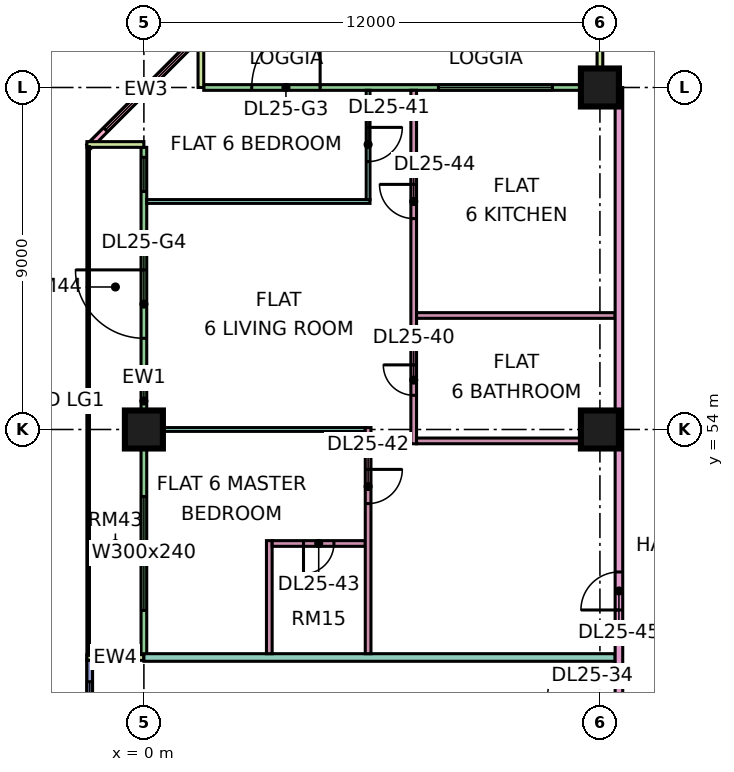
"""IFC4 building model, lengths in metres.
Left out: names, types, materials, properties, quantities, classifications, styles, units other than length and angle.
Written with IfcOpenShell. Run it as: python <this file> out.ifc"""

import sys

from ifc_helpers import new_model, si_unit, direction, frame, frame_2d, origin, origin_2d, place, context, subcontext, project, spatial, rectangle, extrude, element, fill, save


model = new_model("IFC4")
c1 = context("Model", 3, precision=1e-05, world=origin(), true_north=direction((0.0, 1.0)))
c2 = subcontext(c1, "Body", "Model", "MODEL_VIEW")
j1 = project(units=[si_unit("LENGTHUNIT", "METRE"), si_unit("PLANEANGLEUNIT", "RADIAN")], contexts=[c1])
p1 = place(None, origin())
s1 = spatial("IfcSite", under=j1, at=p1, CompositionType="ELEMENT")
p2 = place(p1, origin())
s2 = spatial("IfcBuilding", under=s1, at=p2, CompositionType="ELEMENT")
p3 = place(p2, frame((0.0, 0.0, 110.65)))
s3 = spatial("IfcBuildingStorey", under=s2, at=p3, CompositionType="ELEMENT", Elevation=110.65)
for number, where, z_axis, x_axis in (
    (1, (0.0, 54.0, 0.0), (0.0, 0.0, 1.0), (1.0, 0.0, 0.0)),
    (2, (12.0, 54.0, 0.0), (0.0, 0.0, 1.0), (1.0, 0.0, 0.0)),
    (3, (12.0, 63.0, 0.0), (0.0, 0.0, 1.0), (1.0, 0.0, 0.0)),
):
    element("IfcColumn", number, at=place(p3, frame(where, z_axis=z_axis, x_axis=x_axis)), inside=s3, PredefinedType="COLUMN", context=c2, shape_type="SweptSolid", body=[
        extrude(rectangle(XDim=1.0, YDim=1.0, at=origin_2d()), origin(), (0.0, 0.0, 1.0), 3.75),
    ])
p4 = place(p3, frame((11.925, 63.0, 0.0), z_axis=(0.0, 0.0, 1.0), x_axis=(-1.0, 0.0, 0.0)))
e4 = element("IfcWall", 4, at=p4, inside=s3, PredefinedType="SOLIDWALL", context=c2, shape_type="SweptSolid", body=[
    extrude(rectangle(XDim=10.35, YDim=0.15, at=frame_2d((5.175, 0.0))), origin(), (0.0, 0.0, 1.0), 3.35),
])
p5 = place(p4, frame((1.175, 0.0, 0.45)))
e5 = element("IfcOpeningElement", 5, at=p5, cuts=e4, PredefinedType="OPENING", context=c2, shape_type="SweptSolid", body=[
    extrude(rectangle(XDim=3.0, YDim=2.4, at=frame_2d((1.5, 1.2))), frame((0.0, 0.085, 0.0), z_axis=(0.0, -1.0, 0.0), x_axis=(1.0, 0.0, 0.0)), (0.0, 0.0, 1.0), 0.17),
])
p6 = place(p4, frame((7.288, 0.0, 0.0)))
e6 = element("IfcOpeningElement", 6, at=p6, cuts=e4, PredefinedType="OPENING", context=c2, shape_type="SweptSolid", body=[
    extrude(rectangle(XDim=1.8, YDim=2.4, at=frame_2d((0.9, 1.2))), frame((0.0, 0.085, 0.0), z_axis=(0.0, -1.0, 0.0), x_axis=(1.0, 0.0, 0.0)), (0.0, 0.0, 1.0), 0.17),
])
for number, where, z_axis, x_axis in (
    (7, (12.0, 64.5, 0.0), (0.0, 0.0, 1.0), (0.0, -1.0, 0.0)),
    (8, (1.5, 64.5, 0.0), (0.0, 0.0, 1.0), (0.0, -1.0, 0.0)),
):
    element("IfcWall", number, at=place(p3, frame(where, z_axis=z_axis, x_axis=x_axis)), inside=s3, PredefinedType="SOLIDWALL", context=c2, shape_type="SweptSolid", body=[
        extrude(rectangle(XDim=1.5, YDim=0.15, at=frame_2d((0.75, 0.0))), origin(), (0.0, 0.0, 1.0), 3.35),
    ])
p7 = place(p3, frame((1.553, 64.447, 0.0), z_axis=(0.0, 0.0, 1.0), x_axis=(-0.707106781187, -0.707106781187, 0.0)))
e9 = element("IfcWall", 9, at=p7, inside=s3, PredefinedType="SOLIDWALL", context=c2, shape_type="SweptSolid", body=[
    extrude(rectangle(XDim=4.243, YDim=0.15, at=frame_2d((2.121, 0.0))), origin(), (0.0, 0.0, 1.0), 3.35),
])
p8 = place(p7, frame((0.621, 0.0, 0.45)))
e10 = element("IfcOpeningElement", 10, at=p8, cuts=e9, PredefinedType="OPENING", context=c2, shape_type="SweptSolid", body=[
    extrude(rectangle(XDim=3.0, YDim=2.4, at=frame_2d((1.5, 1.2))), frame((0.0, 0.085, 0.0), z_axis=(0.0, -1.0, 0.0), x_axis=(1.0, 0.0, 0.0)), (0.0, 0.0, 1.0), 0.17),
])
p9 = place(p3, frame((0.0, 61.425, 0.0), z_axis=(0.0, 0.0, 1.0), x_axis=(0.0, -1.0, 0.0)))
e11 = element("IfcWall", 11, at=p9, inside=s3, PredefinedType="SOLIDWALL", context=c2, shape_type="SweptSolid", body=[
    extrude(rectangle(XDim=13.35, YDim=0.15, at=frame_2d((6.675, 0.0))), origin(), (0.0, 0.0, 1.0), 3.35),
])
p10 = place(p9, frame((0.262, 0.0, 0.45)))
e12 = element("IfcOpeningElement", 12, at=p10, cuts=e11, PredefinedType="OPENING", context=c2, shape_type="SweptSolid", body=[
    extrude(rectangle(XDim=0.9, YDim=2.4, at=frame_2d((0.45, 1.2))), frame((0.0, 0.085, 0.0), z_axis=(0.0, -1.0, 0.0), x_axis=(1.0, 0.0, 0.0)), (0.0, 0.0, 1.0), 0.17),
])
p11 = place(p9, frame((3.225, 0.0, 0.0)))
e13 = element("IfcOpeningElement", 13, at=p11, cuts=e11, PredefinedType="OPENING", context=c2, shape_type="SweptSolid", body=[
    extrude(rectangle(XDim=1.8, YDim=2.4, at=frame_2d((0.9, 1.2))), frame((0.0, 0.085, 0.0), z_axis=(0.0, -1.0, 0.0), x_axis=(1.0, 0.0, 0.0)), (0.0, 0.0, 1.0), 0.17),
])
p12 = place(p9, frame((9.188, 0.0, 0.45)))
e14 = element("IfcOpeningElement", 14, at=p12, cuts=e11, PredefinedType="OPENING", context=c2, shape_type="SweptSolid", body=[
    extrude(rectangle(XDim=3.0, YDim=2.4, at=frame_2d((1.5, 1.2))), frame((0.0, 0.085, 0.0), z_axis=(0.0, -1.0, 0.0), x_axis=(1.0, 0.0, 0.0)), (0.0, 0.0, 1.0), 0.17),
])
for number, where, z_axis, x_axis in (
    (15, (-1.5, 61.5, 0.0), (0.0, 0.0, 1.0), (1.0, 0.0, 0.0)),
    (16, (-1.5, 48.0, 0.0), (0.0, 0.0, 1.0), (1.0, 0.0, 0.0)),
):
    element("IfcWall", number, at=place(p3, frame(where, z_axis=z_axis, x_axis=x_axis)), inside=s3, PredefinedType="SOLIDWALL", context=c2, shape_type="SweptSolid", body=[
        extrude(rectangle(XDim=1.5, YDim=0.15, at=frame_2d((0.75, 0.0))), origin(), (0.0, 0.0, 1.0), 3.35),
    ])
p13 = place(p3, frame((-1.425, 47.925, 0.0), z_axis=(0.0, 0.0, 1.0), x_axis=(0.0, -1.0, 0.0)))
e17 = element("IfcWall", 17, at=p13, inside=s3, PredefinedType="SOLIDWALL", context=c2, shape_type="SweptSolid", body=[
    extrude(rectangle(XDim=11.85, YDim=0.15, at=frame_2d((5.925, 0.0))), origin(), (0.0, 0.0, 1.0), 3.35),
])
p14 = place(p13, frame((0.562, 0.0, 0.45)))
e18 = element("IfcOpeningElement", 18, at=p14, cuts=e17, PredefinedType="OPENING", context=c2, shape_type="SweptSolid", body=[
    extrude(rectangle(XDim=1.8, YDim=2.4, at=frame_2d((0.9, 1.2))), frame((0.0, 0.085, 0.0), z_axis=(0.0, -1.0, 0.0), x_axis=(1.0, 0.0, 0.0)), (0.0, 0.0, 1.0), 0.17),
])
p15 = place(p13, frame((4.425, 0.0, 0.45)))
e19 = element("IfcOpeningElement", 19, at=p15, cuts=e17, PredefinedType="OPENING", context=c2, shape_type="SweptSolid", body=[
    extrude(rectangle(XDim=3.0, YDim=2.4, at=frame_2d((1.5, 1.2))), frame((0.0, 0.085, 0.0), z_axis=(0.0, -1.0, 0.0), x_axis=(1.0, 0.0, 0.0)), (0.0, 0.0, 1.0), 0.17),
])
p16 = place(p13, frame((9.488, 0.0, 0.45)))
e20 = element("IfcOpeningElement", 20, at=p16, cuts=e17, PredefinedType="OPENING", context=c2, shape_type="SweptSolid", body=[
    extrude(rectangle(XDim=1.8, YDim=2.4, at=frame_2d((0.9, 1.2))), frame((0.0, 0.085, 0.0), z_axis=(0.0, -1.0, 0.0), x_axis=(1.0, 0.0, 0.0)), (0.0, 0.0, 1.0), 0.17),
])
p17 = place(p3, frame((0.0, 48.0, 0.0), z_axis=(0.0, 0.0, 1.0), x_axis=(1.0, 0.0, 0.0)))
e21 = element("IfcWall", 21, at=p17, inside=s3, PredefinedType="PARTITIONING", context=c2, shape_type="SweptSolid", body=[
    extrude(rectangle(XDim=12.4, YDim=0.2, at=frame_2d((6.2, 0.0))), origin(), (0.0, 0.0, 1.0), 3.35),
])
p18 = place(p3, frame((0.074, 54.0, 0.0), z_axis=(0.0, 0.0, 1.0), x_axis=(1.0, 0.0, 0.0)))
e22 = element("IfcWall", 22, at=p18, inside=s3, PredefinedType="PARTITIONING", context=c2, shape_type="SweptSolid", body=[
    extrude(rectangle(XDim=5.751, YDim=0.1, at=frame_2d((2.875, 0.0))), origin(), (0.0, 0.0, 1.0), 3.35),
])
p19 = place(p3, frame((0.074, 60.0, 0.0), z_axis=(0.0, 0.0, 1.0), x_axis=(1.0, 0.0, 0.0)))
e23 = element("IfcWall", 23, at=p19, inside=s3, PredefinedType="PARTITIONING", context=c2, shape_type="SweptSolid", body=[
    extrude(rectangle(XDim=5.876, YDim=0.1, at=frame_2d((2.938, 0.0))), origin(), (0.0, 0.0, 1.0), 3.35),
])
p20 = place(p3, frame((3.3, 48.1, 0.0), z_axis=(0.0, 0.0, 1.0), x_axis=(0.0, 1.0, 0.0)))
e24 = element("IfcWall", 24, at=p20, inside=s3, PredefinedType="PARTITIONING", context=c2, shape_type="SweptSolid", body=[
    extrude(rectangle(XDim=2.975, YDim=0.15, at=frame_2d((1.487, 0.0))), origin(), (0.0, 0.0, 1.0), 3.35),
])
p21 = place(p3, frame((3.375, 51.0, 0.0), z_axis=(0.0, 0.0, 1.0), x_axis=(1.0, 0.0, 0.0)))
e25 = element("IfcWall", 25, at=p21, inside=s3, PredefinedType="PARTITIONING", context=c2, shape_type="SweptSolid", body=[
    extrude(rectangle(XDim=2.45, YDim=0.15, at=frame_2d((1.225, 0.0))), origin(), (0.0, 0.0, 1.0), 3.35),
])
p22 = place(p21, frame((0.825, 0.0, 0.0)))
e26 = element("IfcOpeningElement", 26, at=p22, cuts=e25, PredefinedType="OPENING", context=c2, shape_type="SweptSolid", body=[
    extrude(rectangle(XDim=0.8, YDim=2.1, at=frame_2d((0.4, 1.05))), frame((0.0, 0.085, 0.0), z_axis=(0.0, -1.0, 0.0), x_axis=(1.0, 0.0, 0.0)), (0.0, 0.0, 1.0), 0.17),
])
p23 = place(p3, frame((5.9, 48.1, 0.0), z_axis=(0.0, 0.0, 1.0), x_axis=(0.0, 1.0, 0.0)))
e27 = element("IfcWall", 27, at=p23, inside=s3, PredefinedType="PARTITIONING", context=c2, shape_type="SweptSolid", body=[
    extrude(rectangle(XDim=5.95, YDim=0.15, at=frame_2d((2.975, 0.0))), origin(), (0.0, 0.0, 1.0), 3.35),
])
p24 = place(p23, frame((3.95, 0.0, 0.0)))
e28 = element("IfcOpeningElement", 28, at=p24, cuts=e27, PredefinedType="OPENING", context=c2, shape_type="SweptSolid", body=[
    extrude(rectangle(XDim=0.9, YDim=2.1, at=frame_2d((0.45, 1.05))), frame((0.0, 0.085, 0.0), z_axis=(0.0, -1.0, 0.0), x_axis=(1.0, 0.0, 0.0)), (0.0, 0.0, 1.0), 0.17),
])
p25 = place(p3, frame((5.9, 60.05, 0.0), z_axis=(0.0, 0.0, 1.0), x_axis=(0.0, 1.0, 0.0)))
e29 = element("IfcWall", 29, at=p25, inside=s3, PredefinedType="PARTITIONING", context=c2, shape_type="SweptSolid", body=[
    extrude(rectangle(XDim=2.876, YDim=0.1, at=frame_2d((1.438, 0.0))), origin(), (0.0, 0.0, 1.0), 3.35),
])
p26 = place(p25, frame((1.0, 0.0, 0.0)))
e30 = element("IfcOpeningElement", 30, at=p26, cuts=e29, PredefinedType="OPENING", context=c2, shape_type="SweptSolid", body=[
    extrude(rectangle(XDim=0.9, YDim=2.1, at=frame_2d((0.45, 1.05))), frame((0.0, 0.06, 0.0), z_axis=(0.0, -1.0, 0.0), x_axis=(1.0, 0.0, 0.0)), (0.0, 0.0, 1.0), 0.12),
])
p27 = place(p3, frame((7.1, 53.625, 0.0), z_axis=(0.0, 0.0, 1.0), x_axis=(0.0, 1.0, 0.0)))
e31 = element("IfcWall", 31, at=p27, inside=s3, PredefinedType="PARTITIONING", context=c2, shape_type="SweptSolid", body=[
    extrude(rectangle(XDim=9.301, YDim=0.15, at=frame_2d((4.65, 0.0))), origin(), (0.0, 0.0, 1.0), 3.35),
])
p28 = place(p27, frame((1.275, 0.0, 0.0)))
e32 = element("IfcOpeningElement", 32, at=p28, cuts=e31, PredefinedType="OPENING", context=c2, shape_type="SweptSolid", body=[
    extrude(rectangle(XDim=0.8, YDim=2.1, at=frame_2d((0.4, 1.05))), frame((0.0, 0.085, 0.0), z_axis=(0.0, -1.0, 0.0), x_axis=(1.0, 0.0, 0.0)), (0.0, 0.0, 1.0), 0.17),
])
p29 = place(p27, frame((5.925, 0.0, 0.0)))
e33 = element("IfcOpeningElement", 33, at=p29, cuts=e31, PredefinedType="OPENING", context=c2, shape_type="SweptSolid", body=[
    extrude(rectangle(XDim=0.9, YDim=2.1, at=frame_2d((0.45, 1.05))), frame((0.0, 0.085, 0.0), z_axis=(0.0, -1.0, 0.0), x_axis=(1.0, 0.0, 0.0)), (0.0, 0.0, 1.0), 0.17),
])
for number, where, z_axis, x_axis in (
    (34, (7.175, 53.7, 0.0), (0.0, 0.0, 1.0), (1.0, 0.0, 0.0)),
    (35, (7.175, 57.0, 0.0), (0.0, 0.0, 1.0), (1.0, 0.0, 0.0)),
):
    element("IfcWall", number, at=place(p3, frame(where, z_axis=z_axis, x_axis=x_axis)), inside=s3, PredefinedType="PARTITIONING", context=c2, shape_type="SweptSolid", body=[
        extrude(rectangle(XDim=5.225, YDim=0.15, at=frame_2d((2.612, 0.0))), origin(), (0.0, 0.0, 1.0), 3.35),
    ])
p30 = place(p3, frame((12.5, 20.0, 0.0), z_axis=(0.0, 0.0, 1.0), x_axis=(0.0, 1.0, 0.0)))
e36 = element("IfcWall", 36, at=p30, inside=s3, PredefinedType="PARTITIONING", context=c2, shape_type="SweptSolid", body=[
    extrude(rectangle(XDim=43.0, YDim=0.2, at=frame_2d((21.5, 0.0))), origin(), (0.0, 0.0, 1.0), 3.35),
])
p31 = place(p30, frame((25.95, 0.0, 0.0)))
e37 = element("IfcOpeningElement", 37, at=p31, cuts=e36, PredefinedType="OPENING", context=c2, shape_type="SweptSolid", body=[
    extrude(rectangle(XDim=1.0, YDim=2.1, at=frame_2d((0.5, 1.05))), frame((0.0, 0.11, 0.0), z_axis=(0.0, -1.0, 0.0), x_axis=(1.0, 0.0, 0.0)), (0.0, 0.0, 1.0), 0.22),
])
p32 = place(p30, frame((29.25, 0.0, 0.0)))
e38 = element("IfcOpeningElement", 38, at=p32, cuts=e36, PredefinedType="OPENING", context=c2, shape_type="SweptSolid", body=[
    extrude(rectangle(XDim=1.0, YDim=2.1, at=frame_2d((0.5, 1.05))), frame((0.0, 0.11, 0.0), z_axis=(0.0, -1.0, 0.0), x_axis=(1.0, 0.0, 0.0)), (0.0, 0.0, 1.0), 0.22),
])
p33 = place(p30, frame((0.6, 0.0, 0.0)))
e39 = element("IfcOpeningElement", 39, at=p33, cuts=e36, PredefinedType="OPENING", context=c2, shape_type="SweptSolid", body=[
    extrude(rectangle(XDim=1.2, YDim=2.1, at=frame_2d((0.6, 1.05))), frame((0.0, 0.11, 0.0), z_axis=(0.0, -1.0, 0.0), x_axis=(1.0, 0.0, 0.0)), (0.0, 0.0, 1.0), 0.22),
])
p34 = place(p30, frame((4.65, 0.0, 0.0)))
e40 = element("IfcOpeningElement", 40, at=p34, cuts=e36, PredefinedType="OPENING", context=c2, shape_type="SweptSolid", body=[
    extrude(rectangle(XDim=1.0, YDim=2.1, at=frame_2d((0.5, 1.05))), frame((0.0, 0.11, 0.0), z_axis=(0.0, -1.0, 0.0), x_axis=(1.0, 0.0, 0.0)), (0.0, 0.0, 1.0), 0.22),
])
p35 = place(p5, origin())
e41 = element("IfcWindow", 41, at=p35, inside=s3, PartitioningType="SINGLE_PANEL", PredefinedType="WINDOW", context=c2, shape_type="SweptSolid", body=[
    extrude(rectangle(XDim=3.0, YDim=2.4, at=frame_2d((1.5, 1.2))), frame((0.0, 0.03, 0.0), z_axis=(0.0, -1.0, 0.0), x_axis=(1.0, 0.0, 0.0)), (0.0, 0.0, 1.0), 0.06),
])
fill(e5, e41)
p36 = place(p6, frame((1.8, 0.0, 0.0), z_axis=(0.0, 0.0, 1.0), x_axis=(-1.0, 0.0, 0.0)))
e42 = element("IfcDoor", 42, at=p36, inside=s3, OperationType="DOUBLE_DOOR_SINGLE_SWING", PredefinedType="DOOR", context=c2, shape_type="SweptSolid", body=[
    extrude(rectangle(XDim=1.8, YDim=2.4, at=frame_2d((0.9, 1.2))), frame((0.0, 0.025, 0.0), z_axis=(0.0, -1.0, 0.0), x_axis=(1.0, 0.0, 0.0)), (0.0, 0.0, 1.0), 0.05),
])
fill(e6, e42)
p37 = place(p8, origin())
e43 = element("IfcWindow", 43, at=p37, inside=s3, PartitioningType="SINGLE_PANEL", PredefinedType="WINDOW", context=c2, shape_type="SweptSolid", body=[
    extrude(rectangle(XDim=3.0, YDim=2.4, at=frame_2d((1.5, 1.2))), frame((0.0, 0.03, 0.0), z_axis=(0.0, -1.0, 0.0), x_axis=(1.0, 0.0, 0.0)), (0.0, 0.0, 1.0), 0.06),
])
fill(e10, e43)
p38 = place(p10, origin())
e44 = element("IfcWindow", 44, at=p38, inside=s3, PartitioningType="SINGLE_PANEL", PredefinedType="WINDOW", context=c2, shape_type="SweptSolid", body=[
    extrude(rectangle(XDim=0.9, YDim=2.4, at=frame_2d((0.45, 1.2))), frame((0.0, 0.03, 0.0), z_axis=(0.0, -1.0, 0.0), x_axis=(1.0, 0.0, 0.0)), (0.0, 0.0, 1.0), 0.06),
])
fill(e12, e44)
p39 = place(p11, frame((1.8, 0.0, 0.0), z_axis=(0.0, 0.0, 1.0), x_axis=(-1.0, 0.0, 0.0)))
e45 = element("IfcDoor", 45, at=p39, inside=s3, OperationType="DOUBLE_DOOR_SINGLE_SWING", PredefinedType="DOOR", context=c2, shape_type="SweptSolid", body=[
    extrude(rectangle(XDim=1.8, YDim=2.4, at=frame_2d((0.9, 1.2))), frame((0.0, 0.025, 0.0), z_axis=(0.0, -1.0, 0.0), x_axis=(1.0, 0.0, 0.0)), (0.0, 0.0, 1.0), 0.05),
])
fill(e13, e45)
p40 = place(p12, origin())
e46 = element("IfcWindow", 46, at=p40, inside=s3, PartitioningType="SINGLE_PANEL", PredefinedType="WINDOW", context=c2, shape_type="SweptSolid", body=[
    extrude(rectangle(XDim=3.0, YDim=2.4, at=frame_2d((1.5, 1.2))), frame((0.0, 0.03, 0.0), z_axis=(0.0, -1.0, 0.0), x_axis=(1.0, 0.0, 0.0)), (0.0, 0.0, 1.0), 0.06),
])
fill(e14, e46)
p41 = place(p14, origin())
e47 = element("IfcWindow", 47, at=p41, inside=s3, PartitioningType="SINGLE_PANEL", PredefinedType="WINDOW", context=c2, shape_type="SweptSolid", body=[
    extrude(rectangle(XDim=1.8, YDim=2.4, at=frame_2d((0.9, 1.2))), frame((0.0, 0.03, 0.0), z_axis=(0.0, -1.0, 0.0), x_axis=(1.0, 0.0, 0.0)), (0.0, 0.0, 1.0), 0.06),
])
fill(e18, e47)
p42 = place(p28, frame((0.8, 0.0, 0.0), z_axis=(0.0, 0.0, 1.0), x_axis=(-1.0, 0.0, 0.0)))
e48 = element("IfcDoor", 48, at=p42, inside=s3, OperationType="SINGLE_SWING_RIGHT", PredefinedType="DOOR", context=c2, shape_type="SweptSolid", body=[
    extrude(rectangle(XDim=0.8, YDim=2.1, at=frame_2d((0.4, 1.05))), frame((0.0, 0.025, 0.0), z_axis=(0.0, -1.0, 0.0), x_axis=(1.0, 0.0, 0.0)), (0.0, 0.0, 1.0), 0.05),
])
fill(e32, e48)
p43 = place(p26, origin())
e49 = element("IfcDoor", 49, at=p43, inside=s3, OperationType="SINGLE_SWING_RIGHT", PredefinedType="DOOR", context=c2, shape_type="SweptSolid", body=[
    extrude(rectangle(XDim=0.9, YDim=2.1, at=frame_2d((0.45, 1.05))), frame((0.0, 0.025, 0.0), z_axis=(0.0, -1.0, 0.0), x_axis=(1.0, 0.0, 0.0)), (0.0, 0.0, 1.0), 0.05),
])
fill(e30, e49)
p44 = place(p24, origin())
e50 = element("IfcDoor", 50, at=p44, inside=s3, OperationType="SINGLE_SWING_RIGHT", PredefinedType="DOOR", context=c2, shape_type="SweptSolid", body=[
    extrude(rectangle(XDim=0.9, YDim=2.1, at=frame_2d((0.45, 1.05))), frame((0.0, 0.025, 0.0), z_axis=(0.0, -1.0, 0.0), x_axis=(1.0, 0.0, 0.0)), (0.0, 0.0, 1.0), 0.05),
])
fill(e28, e50)
p45 = place(p22, frame((0.8, 0.0, 0.0), z_axis=(0.0, 0.0, 1.0), x_axis=(-1.0, 0.0, 0.0)))
e51 = element("IfcDoor", 51, at=p45, inside=s3, OperationType="SINGLE_SWING_LEFT", PredefinedType="DOOR", context=c2, shape_type="SweptSolid", body=[
    extrude(rectangle(XDim=0.8, YDim=2.1, at=frame_2d((0.4, 1.05))), frame((0.0, 0.025, 0.0), z_axis=(0.0, -1.0, 0.0), x_axis=(1.0, 0.0, 0.0)), (0.0, 0.0, 1.0), 0.05),
])
fill(e26, e51)
p46 = place(p29, frame((0.9, 0.0, 0.0), z_axis=(0.0, 0.0, 1.0), x_axis=(-1.0, 0.0, 0.0)))
e52 = element("IfcDoor", 52, at=p46, inside=s3, OperationType="SINGLE_SWING_RIGHT", PredefinedType="DOOR", context=c2, shape_type="SweptSolid", body=[
    extrude(rectangle(XDim=0.9, YDim=2.1, at=frame_2d((0.45, 1.05))), frame((0.0, 0.025, 0.0), z_axis=(0.0, -1.0, 0.0), x_axis=(1.0, 0.0, 0.0)), (0.0, 0.0, 1.0), 0.05),
])
fill(e33, e52)
p47 = place(p32, origin())
e53 = element("IfcDoor", 53, at=p47, inside=s3, OperationType="SINGLE_SWING_LEFT", PredefinedType="DOOR", context=c2, shape_type="SweptSolid", body=[
    extrude(rectangle(XDim=1.0, YDim=2.1, at=frame_2d((0.5, 1.05))), frame((0.0, 0.025, 0.0), z_axis=(0.0, -1.0, 0.0), x_axis=(1.0, 0.0, 0.0)), (0.0, 0.0, 1.0), 0.05),
])
fill(e38, e53)
save(model, sys.argv[1])
